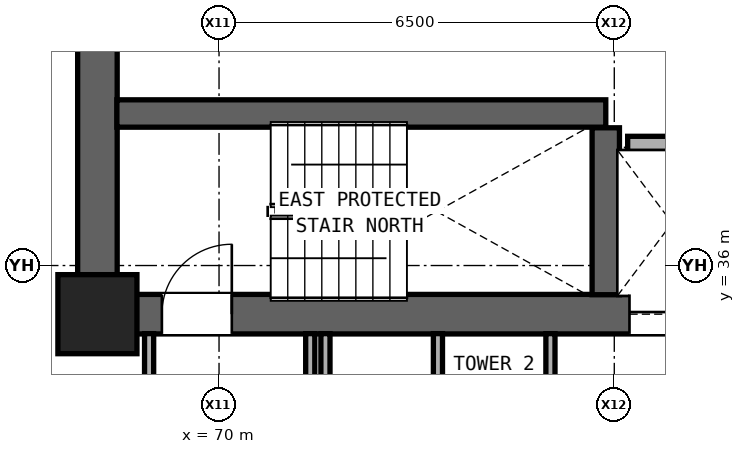
"""IFC4 building model, lengths in metres.
Left out: names, types, materials, properties, quantities, classifications, styles, units other than length and angle.
Written with IfcOpenShell. Run it as: python <this file> out.ifc"""

import sys

from ifc_helpers import new_model, si_unit, direction, frame, frame_2d, origin, origin_2d, place, context, subcontext, project, spatial, rectangle, extrude, element, fill, save


model = new_model("IFC4")
c1 = context("Model", 3, precision=1e-05, world=origin(), true_north=direction((0.0, 1.0)))
c2 = subcontext(c1, "Body", "Model", "MODEL_VIEW")
j1 = project(units=[si_unit("LENGTHUNIT", "METRE"), si_unit("PLANEANGLEUNIT", "RADIAN")], contexts=[c1])
p1 = place(None, origin())
s1 = spatial("IfcSite", under=j1, at=p1, CompositionType="ELEMENT")
p2 = place(p1, origin())
s2 = spatial("IfcBuilding", under=s1, at=p2, CompositionType="ELEMENT")
p3 = place(p2, frame((0.0, 0.0, 78.5)))
s3 = spatial("IfcBuildingStorey", under=s2, at=p3, CompositionType="ELEMENT", Elevation=78.5)
p4 = place(p3, frame((68.0, 35.2, 0.0), z_axis=(0.0, 0.0, 1.0), x_axis=(1.0, 0.0, 0.0)))
e1 = element("IfcColumn", 1, at=p4, inside=s3, PredefinedType="COLUMN", context=c2, shape_type="SweptSolid", body=[
    extrude(rectangle(XDim=1.3, YDim=1.3, at=origin_2d()), origin(), (0.0, 0.0, 1.0), 3.3),
])
p5 = place(p3, frame((68.0, 35.2, 0.0), z_axis=(0.0, 0.0, 1.0), x_axis=(0.0, 1.0, 0.0)))
e2 = element("IfcWall", 2, at=p5, inside=s3, PredefinedType="SHEAR", context=c2, shape_type="SweptSolid", body=[
    extrude(rectangle(XDim=5.6, YDim=0.65, at=frame_2d((2.8, 0.0))), origin(), (0.0, 0.0, 1.0), 2.94),
])
p6 = place(p3, frame((68.0, 35.2, 0.0), z_axis=(0.0, 0.0, 1.0), x_axis=(1.0, 0.0, 0.0)))
e3 = element("IfcWall", 3, at=p6, inside=s3, PredefinedType="SHEAR", context=c2, shape_type="SweptSolid", body=[
    extrude(rectangle(XDim=17.0, YDim=0.65, at=frame_2d((8.5, 0.0))), origin(), (0.0, 0.0, 1.0), 2.94),
])
p7 = place(p6, frame((1.06, 0.0, 0.0)))
e4 = element("IfcOpeningElement", 4, at=p7, cuts=e3, PredefinedType="OPENING", context=c2, shape_type="SweptSolid", body=[
    extrude(rectangle(XDim=1.15, YDim=2.2, at=frame_2d((0.575, 1.1))), frame((0.0, 0.335, 0.0), z_axis=(0.0, -1.0, 0.0), x_axis=(1.0, 0.0, 0.0)), (0.0, 0.0, 1.0), 0.67),
])
p8 = place(p6, frame((8.75, 0.0, 0.0)))
e5 = element("IfcOpeningElement", 5, at=p8, cuts=e3, PredefinedType="OPENING", context=c2, shape_type="SweptSolid", body=[
    extrude(rectangle(XDim=1.4, YDim=2.35, at=frame_2d((0.7, 1.175))), frame((0.0, 0.335, 0.0), z_axis=(0.0, -1.0, 0.0), x_axis=(1.0, 0.0, 0.0)), (0.0, 0.0, 1.0), 0.67),
])
p9 = place(p6, frame((10.77, 0.0, 0.0)))
e6 = element("IfcOpeningElement", 6, at=p9, cuts=e3, PredefinedType="OPENING", context=c2, shape_type="SweptSolid", body=[
    extrude(rectangle(XDim=1.3, YDim=2.3, at=frame_2d((0.65, 1.15))), frame((0.0, 0.335, 0.0), z_axis=(0.0, -1.0, 0.0), x_axis=(1.0, 0.0, 0.0)), (0.0, 0.0, 1.0), 0.67),
])
p10 = place(p6, frame((12.69, 0.0, 0.0)))
e7 = element("IfcOpeningElement", 7, at=p10, cuts=e3, PredefinedType="OPENING", context=c2, shape_type="SweptSolid", body=[
    extrude(rectangle(XDim=1.3, YDim=2.3, at=frame_2d((0.65, 1.15))), frame((0.0, 0.335, 0.0), z_axis=(0.0, -1.0, 0.0), x_axis=(1.0, 0.0, 0.0)), (0.0, 0.0, 1.0), 0.67),
])
p11 = place(p6, frame((14.57, 0.0, 0.0)))
e8 = element("IfcOpeningElement", 8, at=p11, cuts=e3, PredefinedType="OPENING", context=c2, shape_type="SweptSolid", body=[
    extrude(rectangle(XDim=1.3, YDim=2.3, at=frame_2d((0.65, 1.15))), frame((0.0, 0.335, 0.0), z_axis=(0.0, -1.0, 0.0), x_axis=(1.0, 0.0, 0.0)), (0.0, 0.0, 1.0), 0.67),
])
p12 = place(p3, frame((76.72, 38.0, 0.0), z_axis=(0.0, 0.0, 1.0), x_axis=(1.0, 0.0, 0.0)))
e9 = element("IfcWall", 9, at=p12, inside=s3, PredefinedType="SOLIDWALL", context=c2, shape_type="SweptSolid", body=[
    extrude(rectangle(XDim=3.66, YDim=0.25, at=frame_2d((1.83, 0.0))), origin(), (0.0, 0.0, 1.0), 2.94),
])
p13 = place(p3, frame((68.32, 38.5, 0.0), z_axis=(0.0, 0.0, 1.0), x_axis=(1.0, 0.0, 0.0)))
e10 = element("IfcWall", 10, at=p13, inside=s3, PredefinedType="SHEAR", context=c2, shape_type="SweptSolid", body=[
    extrude(rectangle(XDim=8.04, YDim=0.45, at=frame_2d((4.02, 0.0))), origin(), (0.0, 0.0, 1.0), 2.94),
])
p14 = place(p3, frame((68.85, 32.135, 0.0), z_axis=(0.0, 0.0, 1.0), x_axis=(0.0, 1.0, 0.0)))
e11 = element("IfcWall", 11, at=p14, inside=s3, PredefinedType="PARTITIONING", context=c2, shape_type="SweptSolid", body=[
    extrude(rectangle(XDim=2.745, YDim=0.15, at=frame_2d((1.373, 0.0))), origin(), (0.0, 0.0, 1.0), 2.94),
])
for number, where, z_axis, x_axis in (
    (12, (71.5, 32.17, 0.0), (0.0, 0.0, 1.0), (0.0, 1.0, 0.0)),
    (13, (71.75, 32.17, 0.0), (0.0, 0.0, 1.0), (0.0, 1.0, 0.0)),
    (14, (73.6, 32.17, 0.0), (0.0, 0.0, 1.0), (0.0, 1.0, 0.0)),
    (15, (75.45, 32.17, 0.0), (0.0, 0.0, 1.0), (0.0, 1.0, 0.0)),
):
    element("IfcWall", number, at=place(p3, frame(where, z_axis=z_axis, x_axis=x_axis)), inside=s3, PredefinedType="PARTITIONING", context=c2, shape_type="SweptSolid", body=[
        extrude(rectangle(XDim=2.71, YDim=0.15, at=frame_2d((1.355, 0.0))), origin(), (0.0, 0.0, 1.0), 2.94),
    ])
p15 = place(p3, frame((76.36, 35.52, 0.0), z_axis=(0.0, 0.0, 1.0), x_axis=(0.0, 1.0, 0.0)))
e16 = element("IfcWall", 16, at=p15, inside=s3, PredefinedType="SHEAR", context=c2, shape_type="SweptSolid", body=[
    extrude(rectangle(XDim=2.745, YDim=0.45, at=frame_2d((1.373, 0.0))), origin(), (0.0, 0.0, 1.0), 2.94),
])
p16 = place(p7, origin())
e17 = element("IfcDoor", 17, at=p16, inside=s3, OperationType="SINGLE_SWING_RIGHT", PredefinedType="DOOR", context=c2, shape_type="SweptSolid", body=[
    extrude(rectangle(XDim=1.15, YDim=2.2, at=frame_2d((0.575, 1.1))), frame((0.0, 0.025, 0.0), z_axis=(0.0, -1.0, 0.0), x_axis=(1.0, 0.0, 0.0)), (0.0, 0.0, 1.0), 0.05),
])
fill(e4, e17)
p17 = place(p8, origin())
e18 = element("IfcDoor", 18, at=p17, inside=s3, OperationType="DOUBLE_DOOR_SLIDING", PredefinedType="DOOR", context=c2, shape_type="SweptSolid", body=[
    extrude(rectangle(XDim=1.4, YDim=2.35, at=frame_2d((0.7, 1.175))), frame((0.0, 0.025, 0.0), z_axis=(0.0, -1.0, 0.0), x_axis=(1.0, 0.0, 0.0)), (0.0, 0.0, 1.0), 0.05),
])
fill(e5, e18)
save(model, sys.argv[1])
